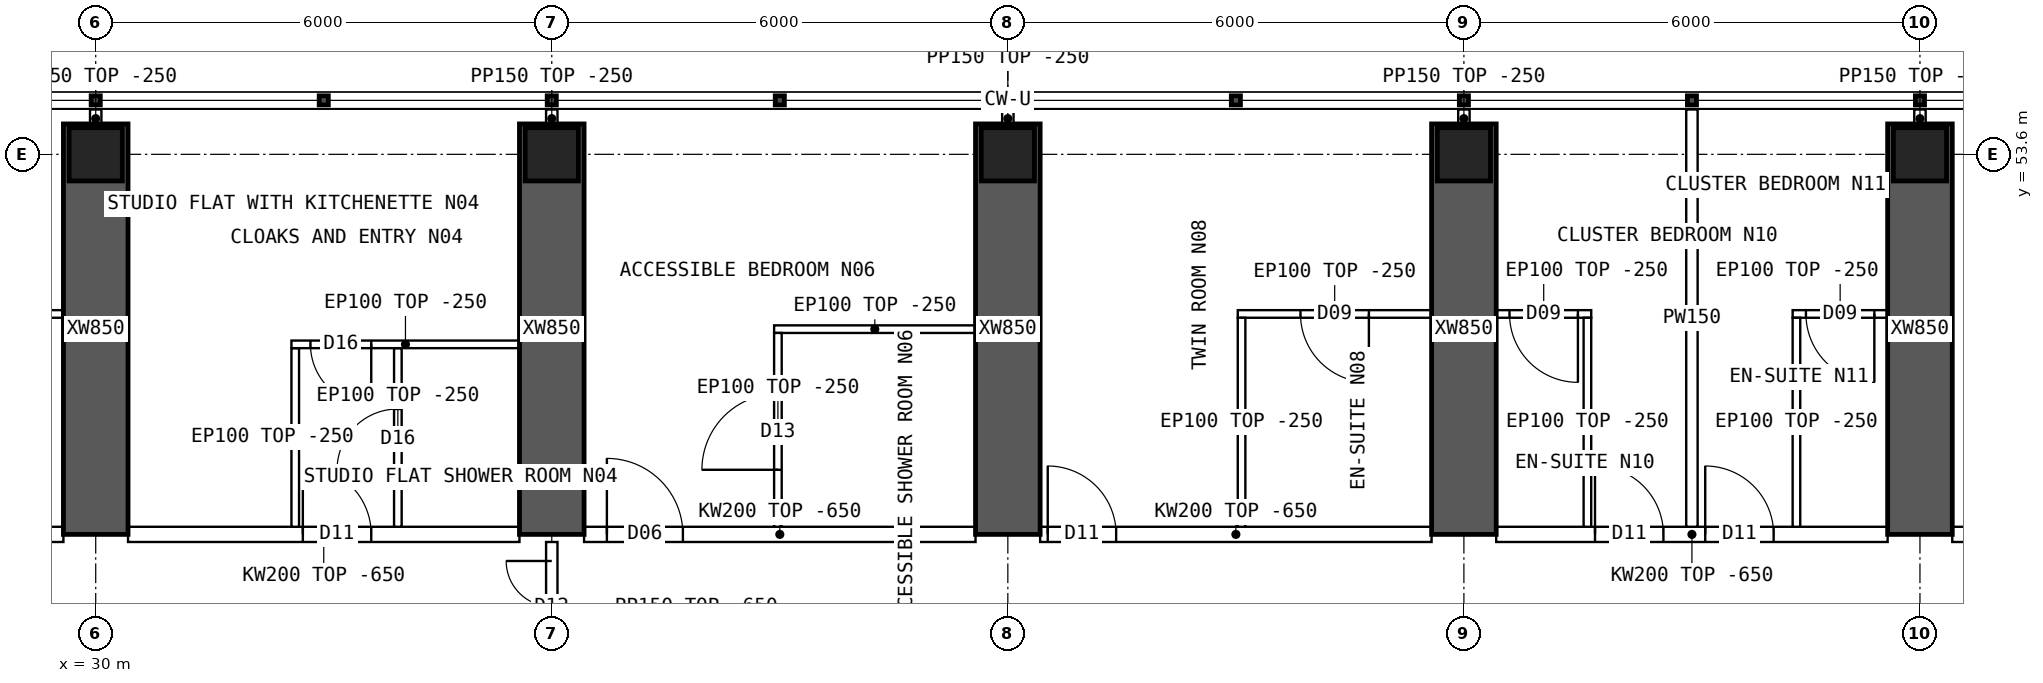
"""IFC4 building model, lengths in metres.
Left out: names, types, materials, properties, quantities, classifications, styles, units other than length and angle.
Written with IfcOpenShell. Run it as: python <this file> out.ifc"""

import sys

from ifc_helpers import new_model, si_unit, direction, frame, frame_2d, origin, origin_2d, place, context, subcontext, project, spatial, polyline, rectangle, hollow_rectangle, outline, extrude, element, fill, save


model = new_model("IFC4")
c1 = context("Model", 3, precision=1e-05, world=origin(), true_north=direction((0.0, 1.0)))
c2 = subcontext(c1, "Body", "Model", "MODEL_VIEW")
j1 = project(units=[si_unit("LENGTHUNIT", "METRE"), si_unit("PLANEANGLEUNIT", "RADIAN")], contexts=[c1])
p1 = place(None, origin())
s1 = spatial("IfcSite", under=j1, at=p1, CompositionType="ELEMENT")
p2 = place(p1, origin())
s2 = spatial("IfcBuilding", under=s1, at=p2, CompositionType="ELEMENT")
p3 = place(p2, frame((0.0, 0.0, 167.35)))
s3 = spatial("IfcBuildingStorey", under=s2, at=p3, CompositionType="ELEMENT", Elevation=167.35)
for number, where, z_axis, x_axis in (
    (1, (30.0, 53.6, 0.0), (0.0, 0.0, 1.0), (1.0, 0.0, 0.0)),
    (2, (36.0, 53.6, 0.0), (0.0, 0.0, 1.0), (1.0, 0.0, 0.0)),
    (3, (42.0, 53.6, 0.0), (0.0, 0.0, 1.0), (1.0, 0.0, 0.0)),
    (4, (48.0, 53.6, 0.0), (0.0, 0.0, 1.0), (1.0, 0.0, 0.0)),
    (5, (54.0, 53.6, 0.0), (0.0, 0.0, 1.0), (1.0, 0.0, 0.0)),
):
    element("IfcColumn", number, at=place(p3, frame(where, z_axis=z_axis, x_axis=x_axis)), inside=s3, PredefinedType="COLUMN", context=c2, shape_type="SweptSolid", body=[
        extrude(hollow_rectangle(XDim=0.7, YDim=0.7, WallThickness=0.07, at=origin_2d()), origin(), (0.0, 0.0, 1.0), 3.75),
    ])
for number, where, z_axis, x_axis in (
    (6, (30.0, 48.6, 0.0), (0.0, 0.0, 1.0), (0.0, 1.0, 0.0)),
    (7, (36.0, 48.6, 0.0), (0.0, 0.0, 1.0), (0.0, 1.0, 0.0)),
    (8, (42.0, 48.6, 0.0), (0.0, 0.0, 1.0), (0.0, 1.0, 0.0)),
    (9, (48.0, 48.6, 0.0), (0.0, 0.0, 1.0), (0.0, 1.0, 0.0)),
    (10, (54.0, 48.6, 0.0), (0.0, 0.0, 1.0), (0.0, 1.0, 0.0)),
):
    element("IfcWall", number, at=place(p3, frame(where, z_axis=z_axis, x_axis=x_axis)), inside=s3, PredefinedType="SHEAR", context=c2, shape_type="SweptSolid", body=[
        extrude(rectangle(XDim=5.4, YDim=0.85, at=frame_2d((2.7, 0.0))), origin(), (0.0, 0.0, 1.0), 3.75),
    ])
p4 = place(p3, frame((24.425, 48.6, 0.0), z_axis=(0.0, 0.0, 1.0), x_axis=(1.0, 0.0, 0.0)))
e11 = element("IfcWall", 11, at=p4, inside=s3, PredefinedType="SOLIDWALL", context=c2, shape_type="SweptSolid", body=[
    extrude(outline(polyline([(0.0, 0.0), (5.15, 0.0), (5.15, 3.1), (0.0, 3.1), (0.0, 0.0)])), frame((0.0, 0.1, 0.0), z_axis=(0.0, -1.0, 0.0), x_axis=(1.0, 0.0, 0.0)), (0.0, 0.0, 1.0), 0.2),
])
p5 = place(p4, frame((0.1, 0.0, 0.0)))
e12 = element("IfcOpeningElement", 12, at=p5, cuts=e11, PredefinedType="OPENING", context=c2, shape_type="SweptSolid", body=[
    extrude(rectangle(XDim=0.9, YDim=2.1, at=frame_2d((0.45, 1.05))), frame((0.0, 0.11, 0.0), z_axis=(0.0, -1.0, 0.0), x_axis=(1.0, 0.0, 0.0)), (0.0, 0.0, 1.0), 0.22),
])
p6 = place(p3, frame((30.425, 48.6, 0.0), z_axis=(0.0, 0.0, 1.0), x_axis=(1.0, 0.0, 0.0)))
e13 = element("IfcWall", 13, at=p6, inside=s3, PredefinedType="SOLIDWALL", context=c2, shape_type="SweptSolid", body=[
    extrude(outline(polyline([(0.0, 0.0), (5.15, 0.0), (5.15, 3.1), (0.0, 3.1), (0.0, 0.0)])), frame((0.0, 0.1, 0.0), z_axis=(0.0, -1.0, 0.0), x_axis=(1.0, 0.0, 0.0)), (0.0, 0.0, 1.0), 0.2),
])
p7 = place(p6, frame((2.3, 0.0, 0.0)))
e14 = element("IfcOpeningElement", 14, at=p7, cuts=e13, PredefinedType="OPENING", context=c2, shape_type="SweptSolid", body=[
    extrude(rectangle(XDim=0.9, YDim=2.1, at=frame_2d((0.45, 1.05))), frame((0.0, 0.11, 0.0), z_axis=(0.0, -1.0, 0.0), x_axis=(1.0, 0.0, 0.0)), (0.0, 0.0, 1.0), 0.22),
])
p8 = place(p3, frame((36.425, 48.6, 0.0), z_axis=(0.0, 0.0, 1.0), x_axis=(1.0, 0.0, 0.0)))
e15 = element("IfcWall", 15, at=p8, inside=s3, PredefinedType="SOLIDWALL", context=c2, shape_type="SweptSolid", body=[
    extrude(outline(polyline([(0.0, 0.0), (5.15, 0.0), (5.15, 3.1), (0.0, 3.1), (0.0, 0.0)])), frame((0.0, 0.1, 0.0), z_axis=(0.0, -1.0, 0.0), x_axis=(1.0, 0.0, 0.0)), (0.0, 0.0, 1.0), 0.2),
])
p9 = place(p8, frame((0.3, 0.0, 0.0)))
e16 = element("IfcOpeningElement", 16, at=p9, cuts=e15, PredefinedType="OPENING", context=c2, shape_type="SweptSolid", body=[
    extrude(rectangle(XDim=1.0, YDim=2.1, at=frame_2d((0.5, 1.05))), frame((0.0, 0.11, 0.0), z_axis=(0.0, -1.0, 0.0), x_axis=(1.0, 0.0, 0.0)), (0.0, 0.0, 1.0), 0.22),
])
p10 = place(p3, frame((42.425, 48.6, 0.0), z_axis=(0.0, 0.0, 1.0), x_axis=(1.0, 0.0, 0.0)))
e17 = element("IfcWall", 17, at=p10, inside=s3, PredefinedType="SOLIDWALL", context=c2, shape_type="SweptSolid", body=[
    extrude(outline(polyline([(0.0, 0.0), (5.15, 0.0), (5.15, 3.1), (0.0, 3.1), (0.0, 0.0)])), frame((0.0, 0.1, 0.0), z_axis=(0.0, -1.0, 0.0), x_axis=(1.0, 0.0, 0.0)), (0.0, 0.0, 1.0), 0.2),
])
p11 = place(p10, frame((0.1, 0.0, 0.0)))
e18 = element("IfcOpeningElement", 18, at=p11, cuts=e17, PredefinedType="OPENING", context=c2, shape_type="SweptSolid", body=[
    extrude(rectangle(XDim=0.9, YDim=2.1, at=frame_2d((0.45, 1.05))), frame((0.0, 0.11, 0.0), z_axis=(0.0, -1.0, 0.0), x_axis=(1.0, 0.0, 0.0)), (0.0, 0.0, 1.0), 0.22),
])
p12 = place(p3, frame((48.425, 48.6, 0.0), z_axis=(0.0, 0.0, 1.0), x_axis=(1.0, 0.0, 0.0)))
e19 = element("IfcWall", 19, at=p12, inside=s3, PredefinedType="SOLIDWALL", context=c2, shape_type="SweptSolid", body=[
    extrude(outline(polyline([(0.0, 0.0), (5.15, 0.0), (5.15, 3.1), (0.0, 3.1), (0.0, 0.0)])), frame((0.0, 0.1, 0.0), z_axis=(0.0, -1.0, 0.0), x_axis=(1.0, 0.0, 0.0)), (0.0, 0.0, 1.0), 0.2),
])
p13 = place(p12, frame((1.3, 0.0, 0.0)))
e20 = element("IfcOpeningElement", 20, at=p13, cuts=e19, PredefinedType="OPENING", context=c2, shape_type="SweptSolid", body=[
    extrude(rectangle(XDim=0.9, YDim=2.1, at=frame_2d((0.45, 1.05))), frame((0.0, 0.11, 0.0), z_axis=(0.0, -1.0, 0.0), x_axis=(1.0, 0.0, 0.0)), (0.0, 0.0, 1.0), 0.22),
])
p14 = place(p12, frame((2.75, 0.0, 0.0)))
e21 = element("IfcOpeningElement", 21, at=p14, cuts=e19, PredefinedType="OPENING", context=c2, shape_type="SweptSolid", body=[
    extrude(rectangle(XDim=0.9, YDim=2.1, at=frame_2d((0.45, 1.05))), frame((0.0, 0.11, 0.0), z_axis=(0.0, -1.0, 0.0), x_axis=(1.0, 0.0, 0.0)), (0.0, 0.0, 1.0), 0.22),
])
p15 = place(p3, frame((54.425, 48.6, 0.0), z_axis=(0.0, 0.0, 1.0), x_axis=(1.0, 0.0, 0.0)))
e22 = element("IfcWall", 22, at=p15, inside=s3, PredefinedType="SOLIDWALL", context=c2, shape_type="SweptSolid", body=[
    extrude(outline(polyline([(0.0, 0.0), (5.15, 0.0), (5.15, 3.1), (0.0, 3.1), (0.0, 0.0)])), frame((0.0, 0.1, 0.0), z_axis=(0.0, -1.0, 0.0), x_axis=(1.0, 0.0, 0.0)), (0.0, 0.0, 1.0), 0.2),
])
p16 = place(p15, frame((0.6, 0.0, 0.0)))
e23 = element("IfcOpeningElement", 23, at=p16, cuts=e22, PredefinedType="OPENING", context=c2, shape_type="SweptSolid", body=[
    extrude(rectangle(XDim=1.0, YDim=2.1, at=frame_2d((0.5, 1.05))), frame((0.0, 0.11, 0.0), z_axis=(0.0, -1.0, 0.0), x_axis=(1.0, 0.0, 0.0)), (0.0, 0.0, 1.0), 0.22),
])
p17 = place(p3, frame((27.025, 51.5, 0.0), z_axis=(0.0, 0.0, 1.0), x_axis=(1.0, 0.0, 0.0)))
e24 = element("IfcWall", 24, at=p17, inside=s3, PredefinedType="PARTITIONING", context=c2, shape_type="SweptSolid", body=[
    extrude(rectangle(XDim=2.55, YDim=0.1, at=frame_2d((1.275, 0.0))), origin(), (0.0, 0.0, 1.0), 3.5),
])
p18 = place(p17, frame((0.825, 0.0, 0.0)))
e25 = element("IfcOpeningElement", 25, at=p18, cuts=e24, PredefinedType="OPENING", context=c2, shape_type="SweptSolid", body=[
    extrude(rectangle(XDim=0.9, YDim=2.1, at=frame_2d((0.45, 1.05))), frame((0.0, 0.06, 0.0), z_axis=(0.0, -1.0, 0.0), x_axis=(1.0, 0.0, 0.0)), (0.0, 0.0, 1.0), 0.12),
])
p19 = place(p3, frame((32.575, 51.1, 0.0), z_axis=(0.0, 0.0, 1.0), x_axis=(1.0, 0.0, 0.0)))
e26 = element("IfcWall", 26, at=p19, inside=s3, PredefinedType="PARTITIONING", context=c2, shape_type="SweptSolid", body=[
    extrude(rectangle(XDim=3.0, YDim=0.1, at=frame_2d((1.5, 0.0))), origin(), (0.0, 0.0, 1.0), 3.5),
])
p20 = place(p19, frame((0.25, 0.0, 0.0)))
e27 = element("IfcOpeningElement", 27, at=p20, cuts=e26, PredefinedType="OPENING", context=c2, shape_type="SweptSolid", body=[
    extrude(rectangle(XDim=0.8, YDim=2.1, at=frame_2d((0.4, 1.05))), frame((0.0, 0.06, 0.0), z_axis=(0.0, -1.0, 0.0), x_axis=(1.0, 0.0, 0.0)), (0.0, 0.0, 1.0), 0.12),
])
p21 = place(p3, frame((32.625, 51.05, 0.0), z_axis=(0.0, 0.0, 1.0), x_axis=(0.0, -1.0, 0.0)))
e28 = element("IfcWall", 28, at=p21, inside=s3, PredefinedType="PARTITIONING", context=c2, shape_type="SweptSolid", body=[
    extrude(outline(polyline([(0.0, 0.0), (2.35, 0.0), (2.35, 3.1), (2.302, 3.1), (2.3, 3.5), (0.0, 3.5), (0.0, 0.0)])), frame((0.0, 0.05, 0.0), z_axis=(0.0, -1.0, 0.0), x_axis=(1.0, 0.0, 0.0)), (0.0, 0.0, 1.0), 0.1),
])
p22 = place(p3, frame((33.975, 51.05, 0.0), z_axis=(0.0, 0.0, 1.0), x_axis=(0.0, -1.0, 0.0)))
e29 = element("IfcWall", 29, at=p22, inside=s3, PredefinedType="PARTITIONING", context=c2, shape_type="SweptSolid", body=[
    extrude(outline(polyline([(0.0, 0.0), (2.35, 0.0), (2.35, 3.1), (2.302, 3.1), (2.3, 3.5), (0.0, 3.5), (0.0, 0.0)])), frame((0.0, 0.05, 0.0), z_axis=(0.0, -1.0, 0.0), x_axis=(1.0, 0.0, 0.0)), (0.0, 0.0, 1.0), 0.1),
])
p23 = place(p22, frame((0.8, 0.0, 0.0)))
e30 = element("IfcOpeningElement", 30, at=p23, cuts=e29, PredefinedType="OPENING", context=c2, shape_type="SweptSolid", body=[
    extrude(rectangle(XDim=0.8, YDim=2.1, at=frame_2d((0.4, 1.05))), frame((0.0, 0.06, 0.0), z_axis=(0.0, -1.0, 0.0), x_axis=(1.0, 0.0, 0.0)), (0.0, 0.0, 1.0), 0.12),
])
p24 = place(p3, frame((38.925, 51.3, 0.0), z_axis=(0.0, 0.0, 1.0), x_axis=(1.0, 0.0, 0.0)))
e31 = element("IfcWall", 31, at=p24, inside=s3, PredefinedType="PARTITIONING", context=c2, shape_type="SweptSolid", body=[
    extrude(rectangle(XDim=2.65, YDim=0.1, at=frame_2d((1.325, 0.0))), origin(), (0.0, 0.0, 1.0), 3.5),
])
p25 = place(p3, frame((38.975, 51.25, 0.0), z_axis=(0.0, 0.0, 1.0), x_axis=(0.0, -1.0, 0.0)))
e32 = element("IfcWall", 32, at=p25, inside=s3, PredefinedType="PARTITIONING", context=c2, shape_type="SweptSolid", body=[
    extrude(outline(polyline([(0.0, 0.0), (2.55, 0.0), (2.55, 3.1), (2.502, 3.1), (2.5, 3.5), (0.0, 3.5), (0.0, 0.0)])), frame((0.0, 0.05, 0.0), z_axis=(0.0, -1.0, 0.0), x_axis=(1.0, 0.0, 0.0)), (0.0, 0.0, 1.0), 0.1),
])
p26 = place(p25, frame((0.8, 0.0, 0.0)))
e33 = element("IfcOpeningElement", 33, at=p26, cuts=e32, PredefinedType="OPENING", context=c2, shape_type="SweptSolid", body=[
    extrude(rectangle(XDim=1.0, YDim=2.1, at=frame_2d((0.5, 1.05))), frame((0.0, 0.06, 0.0), z_axis=(0.0, -1.0, 0.0), x_axis=(1.0, 0.0, 0.0)), (0.0, 0.0, 1.0), 0.12),
])
p27 = place(p3, frame((45.025, 51.5, 0.0), z_axis=(0.0, 0.0, 1.0), x_axis=(1.0, 0.0, 0.0)))
e34 = element("IfcWall", 34, at=p27, inside=s3, PredefinedType="PARTITIONING", context=c2, shape_type="SweptSolid", body=[
    extrude(rectangle(XDim=2.55, YDim=0.1, at=frame_2d((1.275, 0.0))), origin(), (0.0, 0.0, 1.0), 3.5),
])
p28 = place(p27, frame((0.825, 0.0, 0.0)))
e35 = element("IfcOpeningElement", 35, at=p28, cuts=e34, PredefinedType="OPENING", context=c2, shape_type="SweptSolid", body=[
    extrude(rectangle(XDim=0.9, YDim=2.1, at=frame_2d((0.45, 1.05))), frame((0.0, 0.06, 0.0), z_axis=(0.0, -1.0, 0.0), x_axis=(1.0, 0.0, 0.0)), (0.0, 0.0, 1.0), 0.12),
])
p29 = place(p3, frame((45.075, 51.45, 0.0), z_axis=(0.0, 0.0, 1.0), x_axis=(0.0, -1.0, 0.0)))
e36 = element("IfcWall", 36, at=p29, inside=s3, PredefinedType="PARTITIONING", context=c2, shape_type="SweptSolid", body=[
    extrude(outline(polyline([(0.0, 0.0), (2.75, 0.0), (2.75, 3.1), (2.702, 3.1), (2.7, 3.5), (0.0, 3.5), (0.0, 0.0)])), frame((0.0, 0.05, 0.0), z_axis=(0.0, -1.0, 0.0), x_axis=(1.0, 0.0, 0.0)), (0.0, 0.0, 1.0), 0.1),
])
p30 = place(p3, frame((51.0, 54.19, 0.0), z_axis=(0.0, 0.0, 1.0), x_axis=(0.0, -1.0, 0.0)))
e37 = element("IfcWall", 37, at=p30, inside=s3, PredefinedType="PARTITIONING", context=c2, shape_type="SweptSolid", body=[
    extrude(outline(polyline([(0.0, 0.0), (5.49, 0.0), (5.49, 3.1), (5.442, 3.1), (5.44, 3.5), (0.792, 3.5), (0.79, 3.1), (0.392, 3.1), (0.39, 3.5), (0.0, 3.5), (0.0, 0.0)])), frame((0.0, 0.075, 0.0), z_axis=(0.0, -1.0, 0.0), x_axis=(1.0, 0.0, 0.0)), (0.0, 0.0, 1.0), 0.15),
])
p31 = place(p3, frame((48.425, 51.5, 0.0), z_axis=(0.0, 0.0, 1.0), x_axis=(1.0, 0.0, 0.0)))
e38 = element("IfcWall", 38, at=p31, inside=s3, PredefinedType="PARTITIONING", context=c2, shape_type="SweptSolid", body=[
    extrude(rectangle(XDim=1.25, YDim=0.1, at=frame_2d((0.625, 0.0))), origin(), (0.0, 0.0, 1.0), 3.5),
])
p32 = place(p31, frame((0.175, 0.0, 0.0)))
e39 = element("IfcOpeningElement", 39, at=p32, cuts=e38, PredefinedType="OPENING", context=c2, shape_type="SweptSolid", body=[
    extrude(rectangle(XDim=0.9, YDim=2.1, at=frame_2d((0.45, 1.05))), frame((0.0, 0.06, 0.0), z_axis=(0.0, -1.0, 0.0), x_axis=(1.0, 0.0, 0.0)), (0.0, 0.0, 1.0), 0.12),
])
p33 = place(p3, frame((49.625, 51.45, 0.0), z_axis=(0.0, 0.0, 1.0), x_axis=(0.0, -1.0, 0.0)))
e40 = element("IfcWall", 40, at=p33, inside=s3, PredefinedType="PARTITIONING", context=c2, shape_type="SweptSolid", body=[
    extrude(outline(polyline([(0.0, 0.0), (2.75, 0.0), (2.75, 3.1), (2.702, 3.1), (2.7, 3.5), (0.0, 3.5), (0.0, 0.0)])), frame((0.0, 0.05, 0.0), z_axis=(0.0, -1.0, 0.0), x_axis=(1.0, 0.0, 0.0)), (0.0, 0.0, 1.0), 0.1),
])
p34 = place(p3, frame((52.325, 51.5, 0.0), z_axis=(0.0, 0.0, 1.0), x_axis=(1.0, 0.0, 0.0)))
e41 = element("IfcWall", 41, at=p34, inside=s3, PredefinedType="PARTITIONING", context=c2, shape_type="SweptSolid", body=[
    extrude(rectangle(XDim=1.25, YDim=0.1, at=frame_2d((0.625, 0.0))), origin(), (0.0, 0.0, 1.0), 3.5),
])
p35 = place(p34, frame((0.175, 0.0, 0.0)))
e42 = element("IfcOpeningElement", 42, at=p35, cuts=e41, PredefinedType="OPENING", context=c2, shape_type="SweptSolid", body=[
    extrude(rectangle(XDim=0.9, YDim=2.1, at=frame_2d((0.45, 1.05))), frame((0.0, 0.06, 0.0), z_axis=(0.0, -1.0, 0.0), x_axis=(1.0, 0.0, 0.0)), (0.0, 0.0, 1.0), 0.12),
])
p36 = place(p3, frame((52.375, 51.45, 0.0), z_axis=(0.0, 0.0, 1.0), x_axis=(0.0, -1.0, 0.0)))
e43 = element("IfcWall", 43, at=p36, inside=s3, PredefinedType="PARTITIONING", context=c2, shape_type="SweptSolid", body=[
    extrude(outline(polyline([(0.0, 0.0), (2.75, 0.0), (2.75, 3.1), (2.702, 3.1), (2.7, 3.5), (0.0, 3.5), (0.0, 0.0)])), frame((0.0, 0.05, 0.0), z_axis=(0.0, -1.0, 0.0), x_axis=(1.0, 0.0, 0.0)), (0.0, 0.0, 1.0), 0.1),
])
p37 = place(p3, frame((36.0, 46.8, 0.0), z_axis=(0.0, 0.0, 1.0), x_axis=(0.0, 1.0, 0.0)))
e44 = element("IfcWall", 44, at=p37, inside=s3, PredefinedType="PARTITIONING", context=c2, shape_type="SweptSolid", body=[
    extrude(outline(polyline([(0.0, 0.0), (1.7, 0.0), (1.7, 3.1), (0.0, 3.1), (0.0, 0.0)])), frame((0.0, 0.075, 0.0), z_axis=(0.0, -1.0, 0.0), x_axis=(1.0, 0.0, 0.0)), (0.0, 0.0, 1.0), 0.15),
])
p38 = place(p37, frame((0.25, 0.0, 0.0)))
e45 = element("IfcOpeningElement", 45, at=p38, cuts=e44, PredefinedType="OPENING", context=c2, shape_type="SweptSolid", body=[
    extrude(rectangle(XDim=1.2, YDim=2.1, at=frame_2d((0.6, 1.05))), frame((0.0, 0.085, 0.0), z_axis=(0.0, -1.0, 0.0), x_axis=(1.0, 0.0, 0.0)), (0.0, 0.0, 1.0), 0.17),
])
for number, where, z_axis, x_axis in (
    (46, (30.0, 53.95, 0.0), (0.0, 0.0, 1.0), (0.0, 1.0, 0.0)),
    (47, (36.0, 53.95, 0.0), (0.0, 0.0, 1.0), (0.0, 1.0, 0.0)),
    (48, (42.0, 53.95, 0.0), (0.0, 0.0, 1.0), (0.0, 1.0, 0.0)),
    (49, (48.0, 53.95, 0.0), (0.0, 0.0, 1.0), (0.0, 1.0, 0.0)),
    (50, (54.0, 53.95, 0.0), (0.0, 0.0, 1.0), (0.0, 1.0, 0.0)),
):
    element("IfcWall", number, at=place(p3, frame(where, z_axis=z_axis, x_axis=x_axis)), inside=s3, PredefinedType="PARTITIONING", context=c2, shape_type="SweptSolid", body=[
        extrude(rectangle(XDim=0.24, YDim=0.15, at=frame_2d((0.12, 0.0))), origin(), (0.0, 0.0, 1.0), 3.5),
    ])
p39 = place(p20, origin())
e51 = element("IfcDoor", 51, at=p39, inside=s3, OperationType="SINGLE_SWING_RIGHT", PredefinedType="DOOR", context=c2, shape_type="SweptSolid", body=[
    extrude(rectangle(XDim=0.8, YDim=2.1, at=frame_2d((0.4, 1.05))), frame((0.0, 0.025, 0.0), z_axis=(0.0, -1.0, 0.0), x_axis=(1.0, 0.0, 0.0)), (0.0, 0.0, 1.0), 0.05),
])
fill(e27, e51)
p40 = place(p23, origin())
e52 = element("IfcDoor", 52, at=p40, inside=s3, OperationType="SINGLE_SWING_RIGHT", PredefinedType="DOOR", context=c2, shape_type="SweptSolid", body=[
    extrude(rectangle(XDim=0.8, YDim=2.1, at=frame_2d((0.4, 1.05))), frame((0.0, 0.025, 0.0), z_axis=(0.0, -1.0, 0.0), x_axis=(1.0, 0.0, 0.0)), (0.0, 0.0, 1.0), 0.05),
])
fill(e30, e52)
p41 = place(p7, origin())
e53 = element("IfcDoor", 53, at=p41, inside=s3, OperationType="SINGLE_SWING_LEFT", PredefinedType="DOOR", context=c2, shape_type="SweptSolid", body=[
    extrude(rectangle(XDim=0.9, YDim=2.1, at=frame_2d((0.45, 1.05))), frame((0.0, 0.025, 0.0), z_axis=(0.0, -1.0, 0.0), x_axis=(1.0, 0.0, 0.0)), (0.0, 0.0, 1.0), 0.05),
])
fill(e14, e53)
p42 = place(p26, origin())
e54 = element("IfcDoor", 54, at=p42, inside=s3, OperationType="SINGLE_SWING_RIGHT", PredefinedType="DOOR", context=c2, shape_type="SweptSolid", body=[
    extrude(rectangle(XDim=1.0, YDim=2.1, at=frame_2d((0.5, 1.05))), frame((0.0, 0.025, 0.0), z_axis=(0.0, -1.0, 0.0), x_axis=(1.0, 0.0, 0.0)), (0.0, 0.0, 1.0), 0.05),
])
fill(e33, e54)
p43 = place(p9, origin())
e55 = element("IfcDoor", 55, at=p43, inside=s3, OperationType="SINGLE_SWING_LEFT", PredefinedType="DOOR", context=c2, shape_type="SweptSolid", body=[
    extrude(rectangle(XDim=1.0, YDim=2.1, at=frame_2d((0.5, 1.05))), frame((0.0, 0.025, 0.0), z_axis=(0.0, -1.0, 0.0), x_axis=(1.0, 0.0, 0.0)), (0.0, 0.0, 1.0), 0.05),
])
fill(e16, e55)
p44 = place(p28, origin())
e56 = element("IfcDoor", 56, at=p44, inside=s3, OperationType="SINGLE_SWING_RIGHT", PredefinedType="DOOR", context=c2, shape_type="SweptSolid", body=[
    extrude(rectangle(XDim=0.9, YDim=2.1, at=frame_2d((0.45, 1.05))), frame((0.0, 0.025, 0.0), z_axis=(0.0, -1.0, 0.0), x_axis=(1.0, 0.0, 0.0)), (0.0, 0.0, 1.0), 0.05),
])
fill(e35, e56)
p45 = place(p11, origin())
e57 = element("IfcDoor", 57, at=p45, inside=s3, OperationType="SINGLE_SWING_LEFT", PredefinedType="DOOR", context=c2, shape_type="SweptSolid", body=[
    extrude(rectangle(XDim=0.9, YDim=2.1, at=frame_2d((0.45, 1.05))), frame((0.0, 0.025, 0.0), z_axis=(0.0, -1.0, 0.0), x_axis=(1.0, 0.0, 0.0)), (0.0, 0.0, 1.0), 0.05),
])
fill(e18, e57)
p46 = place(p32, origin())
e58 = element("IfcDoor", 58, at=p46, inside=s3, OperationType="SINGLE_SWING_RIGHT", PredefinedType="DOOR", context=c2, shape_type="SweptSolid", body=[
    extrude(rectangle(XDim=0.9, YDim=2.1, at=frame_2d((0.45, 1.05))), frame((0.0, 0.025, 0.0), z_axis=(0.0, -1.0, 0.0), x_axis=(1.0, 0.0, 0.0)), (0.0, 0.0, 1.0), 0.05),
])
fill(e39, e58)
p47 = place(p13, origin())
e59 = element("IfcDoor", 59, at=p47, inside=s3, OperationType="SINGLE_SWING_LEFT", PredefinedType="DOOR", context=c2, shape_type="SweptSolid", body=[
    extrude(rectangle(XDim=0.9, YDim=2.1, at=frame_2d((0.45, 1.05))), frame((0.0, 0.025, 0.0), z_axis=(0.0, -1.0, 0.0), x_axis=(1.0, 0.0, 0.0)), (0.0, 0.0, 1.0), 0.05),
])
fill(e20, e59)
p48 = place(p35, origin())
e60 = element("IfcDoor", 60, at=p48, inside=s3, OperationType="SINGLE_SWING_RIGHT", PredefinedType="DOOR", context=c2, shape_type="SweptSolid", body=[
    extrude(rectangle(XDim=0.9, YDim=2.1, at=frame_2d((0.45, 1.05))), frame((0.0, 0.025, 0.0), z_axis=(0.0, -1.0, 0.0), x_axis=(1.0, 0.0, 0.0)), (0.0, 0.0, 1.0), 0.05),
])
fill(e42, e60)
p49 = place(p14, origin())
e61 = element("IfcDoor", 61, at=p49, inside=s3, OperationType="SINGLE_SWING_LEFT", PredefinedType="DOOR", context=c2, shape_type="SweptSolid", body=[
    extrude(rectangle(XDim=0.9, YDim=2.1, at=frame_2d((0.45, 1.05))), frame((0.0, 0.025, 0.0), z_axis=(0.0, -1.0, 0.0), x_axis=(1.0, 0.0, 0.0)), (0.0, 0.0, 1.0), 0.05),
])
fill(e21, e61)
p50 = place(p38, origin())
e62 = element("IfcDoor", 62, at=p50, inside=s3, OperationType="DOUBLE_DOOR_SINGLE_SWING", PredefinedType="DOOR", context=c2, shape_type="SweptSolid", body=[
    extrude(rectangle(XDim=1.2, YDim=2.1, at=frame_2d((0.6, 1.05))), frame((0.0, 0.025, 0.0), z_axis=(0.0, -1.0, 0.0), x_axis=(1.0, 0.0, 0.0)), (0.0, 0.0, 1.0), 0.05),
])
fill(e45, e62)
save(model, sys.argv[1])
